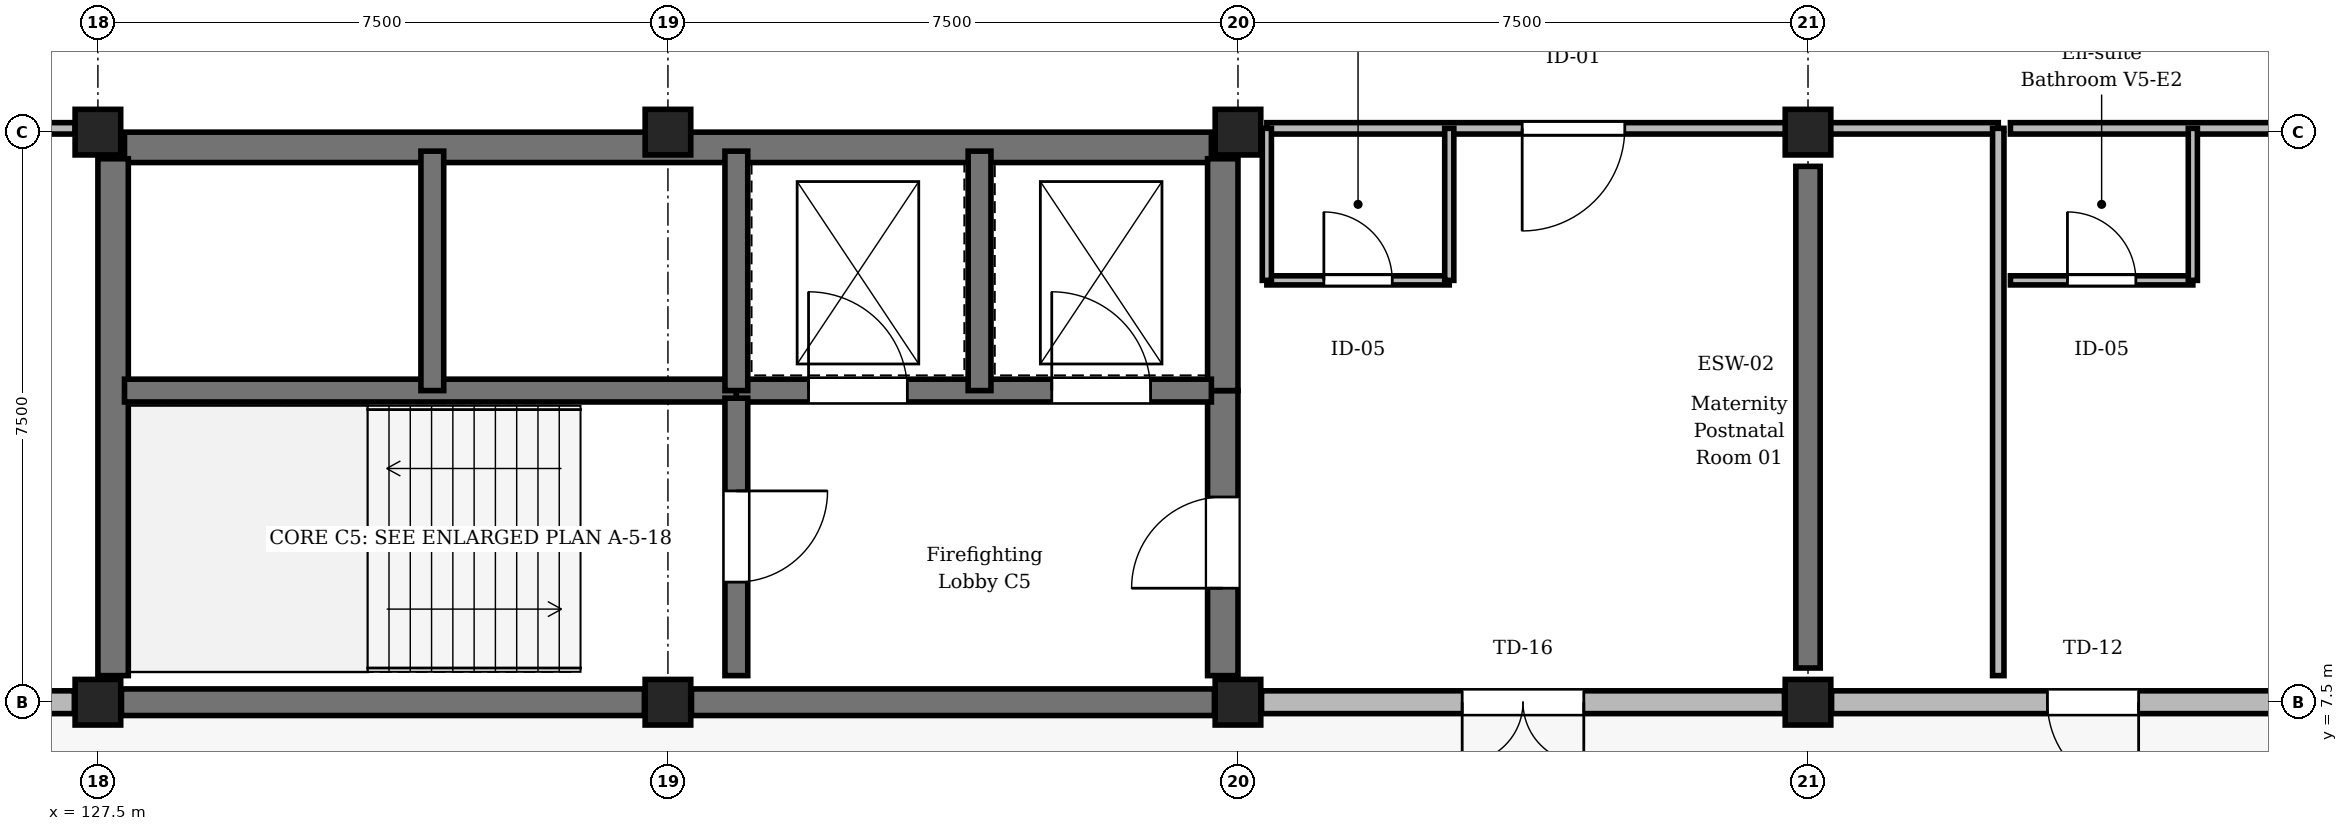
"""IFC4 building model, lengths in metres.
Left out: names, types, materials, properties, quantities, classifications, styles, units other than length and angle.
Written with IfcOpenShell. Run it as: python <this file> out.ifc"""

import sys

from ifc_helpers import new_model, si_unit, direction, frame, frame_2d, origin, origin_2d, place, context, subcontext, project, spatial, rectangle, circle, extrude, element, fill, save


model = new_model("IFC4")
c1 = context("Model", 3, precision=1e-05, world=origin(), true_north=direction((0.0, 1.0)))
c2 = subcontext(c1, "Body", "Model", "MODEL_VIEW")
j1 = project(units=[si_unit("LENGTHUNIT", "METRE"), si_unit("PLANEANGLEUNIT", "RADIAN")], contexts=[c1])
p1 = place(None, origin())
s1 = spatial("IfcSite", under=j1, at=p1, CompositionType="ELEMENT")
p2 = place(p1, origin())
s2 = spatial("IfcBuilding", under=s1, at=p2, CompositionType="ELEMENT")
p3 = place(p2, frame((0.0, 0.0, 14.1)))
s3 = spatial("IfcBuildingStorey", under=s2, at=p3, CompositionType="ELEMENT", Elevation=14.1)
p4 = place(p3, frame((127.5, 7.5, 0.0), z_axis=(0.0, 0.0, 1.0), x_axis=(1.0, 0.0, 0.0)))
e1 = element("IfcColumn", 1, at=p4, inside=s3, PredefinedType="COLUMN", context=c2, shape_type="SweptSolid", body=[
    extrude(circle(Radius=0.3, at=origin_2d()), origin(), (0.0, 0.0, 1.0), 3.75),
])
for number, where, z_axis, x_axis in (
    (2, (127.5, 15.0, 0.0), (0.0, 0.0, 1.0), (1.0, 0.0, 0.0)),
    (3, (135.0, 7.5, 0.0), (0.0, 0.0, 1.0), (1.0, 0.0, 0.0)),
    (4, (135.0, 15.0, 0.0), (0.0, 0.0, 1.0), (1.0, 0.0, 0.0)),
    (5, (142.5, 7.5, 0.0), (0.0, 0.0, 1.0), (1.0, 0.0, 0.0)),
):
    element("IfcColumn", number, at=place(p3, frame(where, z_axis=z_axis, x_axis=x_axis)), inside=s3, PredefinedType="COLUMN", context=c2, shape_type="SweptSolid", body=[
        extrude(rectangle(XDim=0.6, YDim=0.6, at=origin_2d()), origin(), (0.0, 0.0, 1.0), 3.75),
    ])
for number, where, z_axis, x_axis in (
    (6, (142.5, 15.0, 0.0), (0.0, 0.0, 1.0), (1.0, 0.0, 0.0)),
    (7, (150.0, 7.5, 0.0), (0.0, 0.0, 1.0), (1.0, 0.0, 0.0)),
):
    element("IfcColumn", number, at=place(p3, frame(where, z_axis=z_axis, x_axis=x_axis)), inside=s3, PredefinedType="COLUMN", context=c2, shape_type="SweptSolid", body=[
        extrude(circle(Radius=0.3, at=origin_2d()), origin(), (0.0, 0.0, 1.0), 3.75),
    ])
p5 = place(p3, frame((150.0, 15.0, 0.0), z_axis=(0.0, 0.0, 1.0), x_axis=(1.0, 0.0, 0.0)))
e8 = element("IfcColumn", 8, at=p5, inside=s3, PredefinedType="COLUMN", context=c2, shape_type="SweptSolid", body=[
    extrude(rectangle(XDim=0.6, YDim=0.6, at=origin_2d()), origin(), (0.0, 0.0, 1.0), 3.75),
])
p6 = place(p3, frame((150.0, 7.95, 0.0), z_axis=(0.0, 0.0, 1.0), x_axis=(0.0, 1.0, 0.0)))
e9 = element("IfcWall", 9, at=p6, inside=s3, PredefinedType="SHEAR", context=c2, shape_type="SweptSolid", body=[
    extrude(rectangle(XDim=6.6, YDim=0.32, at=frame_2d((3.3, 0.0))), origin(), (0.0, 0.0, 1.0), 2.92),
])
p7 = place(p3, frame((127.19, 7.5, 0.0), z_axis=(0.0, 0.0, 1.0), x_axis=(-1.0, 0.0, 0.0)))
e10 = element("IfcWall", 10, at=p7, inside=s3, PredefinedType="STANDARD", context=c2, shape_type="SweptSolid", body=[
    extrude(rectangle(XDim=6.88, YDim=0.3, at=frame_2d((3.44, 0.0))), origin(), (0.0, 0.0, 1.0), 2.87),
])
p8 = place(p7, frame((2.84, 0.0, 0.0)))
e11 = element("IfcOpeningElement", 11, at=p8, cuts=e10, PredefinedType="OPENING", context=c2, shape_type="SweptSolid", body=[
    extrude(rectangle(XDim=1.2, YDim=2.3, at=frame_2d((0.6, 1.15))), frame((0.0, 0.16, 0.0), z_axis=(0.0, -1.0, 0.0), x_axis=(1.0, 0.0, 0.0)), (0.0, 0.0, 1.0), 0.32),
])
for number, where, z_axis, x_axis in (
    (12, (134.69, 7.5, 0.0), (0.0, 0.0, 1.0), (-1.0, 0.0, 0.0)),
    (13, (142.19, 7.5, 0.0), (0.0, 0.0, 1.0), (-1.0, 0.0, 0.0)),
):
    element("IfcWall", number, at=place(p3, frame(where, z_axis=z_axis, x_axis=x_axis)), inside=s3, PredefinedType="SHEAR", context=c2, shape_type="SweptSolid", body=[
        extrude(rectangle(XDim=6.88, YDim=0.35, at=frame_2d((3.44, 0.0))), origin(), (0.0, 0.0, 1.0), 3.47),
    ])
p9 = place(p3, frame((149.69, 7.5, 0.0), z_axis=(0.0, 0.0, 1.0), x_axis=(-1.0, 0.0, 0.0)))
e14 = element("IfcWall", 14, at=p9, inside=s3, PredefinedType="STANDARD", context=c2, shape_type="SweptSolid", body=[
    extrude(rectangle(XDim=6.88, YDim=0.3, at=frame_2d((3.44, 0.0))), origin(), (0.0, 0.0, 1.0), 2.87),
])
p10 = place(p9, frame((2.64, 0.0, 0.0)))
e15 = element("IfcOpeningElement", 15, at=p10, cuts=e14, PredefinedType="OPENING", context=c2, shape_type="SweptSolid", body=[
    extrude(rectangle(XDim=1.6, YDim=2.35, at=frame_2d((0.8, 1.175))), frame((0.0, 0.16, 0.0), z_axis=(0.0, -1.0, 0.0), x_axis=(1.0, 0.0, 0.0)), (0.0, 0.0, 1.0), 0.32),
])
p11 = place(p3, frame((157.19, 7.5, 0.0), z_axis=(0.0, 0.0, 1.0), x_axis=(-1.0, 0.0, 0.0)))
e16 = element("IfcWall", 16, at=p11, inside=s3, PredefinedType="STANDARD", context=c2, shape_type="SweptSolid", body=[
    extrude(rectangle(XDim=6.88, YDim=0.3, at=frame_2d((3.44, 0.0))), origin(), (0.0, 0.0, 1.0), 2.87),
])
p12 = place(p11, frame((2.84, 0.0, 0.0)))
e17 = element("IfcOpeningElement", 17, at=p12, cuts=e16, PredefinedType="OPENING", context=c2, shape_type="SweptSolid", body=[
    extrude(rectangle(XDim=1.2, YDim=2.3, at=frame_2d((0.6, 1.15))), frame((0.0, 0.16, 0.0), z_axis=(0.0, -1.0, 0.0), x_axis=(1.0, 0.0, 0.0)), (0.0, 0.0, 1.0), 0.32),
])
p13 = place(p3, frame((127.85, 14.8, 0.0), z_axis=(0.0, 0.0, 1.0), x_axis=(1.0, 0.0, 0.0)))
e18 = element("IfcWall", 18, at=p13, inside=s3, PredefinedType="SHEAR", context=c2, shape_type="SweptSolid", body=[
    extrude(rectangle(XDim=14.3, YDim=0.4, at=frame_2d((7.15, 0.0))), origin(), (0.0, 0.0, 1.0), 3.47),
])
p14 = place(p3, frame((127.7, 7.85, 0.0), z_axis=(0.0, 0.0, 1.0), x_axis=(0.0, 1.0, 0.0)))
e19 = element("IfcWall", 19, at=p14, inside=s3, PredefinedType="SHEAR", context=c2, shape_type="SweptSolid", body=[
    extrude(rectangle(XDim=6.8, YDim=0.4, at=frame_2d((3.4, 0.0))), origin(), (0.0, 0.0, 1.0), 3.47),
])
p15 = place(p3, frame((142.3, 7.85, 0.0), z_axis=(0.0, 0.0, 1.0), x_axis=(0.0, 1.0, 0.0)))
e20 = element("IfcWall", 20, at=p15, inside=s3, PredefinedType="SHEAR", context=c2, shape_type="SweptSolid", body=[
    extrude(rectangle(XDim=3.75, YDim=0.4, at=frame_2d((1.875, 0.0))), origin(), (0.0, 0.0, 1.0), 3.47),
])
p16 = place(p15, frame((1.15, 0.0, 0.0)))
e21 = element("IfcOpeningElement", 21, at=p16, cuts=e20, PredefinedType="OPENING", context=c2, shape_type="SweptSolid", body=[
    extrude(rectangle(XDim=1.2, YDim=2.25, at=frame_2d((0.6, 1.125))), frame((0.0, 0.21, 0.0), z_axis=(0.0, -1.0, 0.0), x_axis=(1.0, 0.0, 0.0)), (0.0, 0.0, 1.0), 0.42),
])
p17 = place(p3, frame((142.3, 11.6, 0.0), z_axis=(0.0, 0.0, 1.0), x_axis=(0.0, 1.0, 0.0)))
e22 = element("IfcWall", 22, at=p17, inside=s3, PredefinedType="SHEAR", context=c2, shape_type="SweptSolid", body=[
    extrude(rectangle(XDim=3.05, YDim=0.4, at=frame_2d((1.525, 0.0))), origin(), (0.0, 0.0, 1.0), 3.47),
])
p18 = place(p3, frame((127.85, 11.6, 0.0), z_axis=(0.0, 0.0, 1.0), x_axis=(1.0, 0.0, 0.0)))
e23 = element("IfcWall", 23, at=p18, inside=s3, PredefinedType="SHEAR", context=c2, shape_type="SweptSolid", body=[
    extrude(rectangle(XDim=8.05, YDim=0.3, at=frame_2d((4.025, 0.0))), origin(), (0.0, 0.0, 1.0), 3.47),
])
p19 = place(p3, frame((135.9, 11.6, 0.0), z_axis=(0.0, 0.0, 1.0), x_axis=(1.0, 0.0, 0.0)))
e24 = element("IfcWall", 24, at=p19, inside=s3, PredefinedType="SHEAR", context=c2, shape_type="SweptSolid", body=[
    extrude(rectangle(XDim=6.25, YDim=0.3, at=frame_2d((3.125, 0.0))), origin(), (0.0, 0.0, 1.0), 3.47),
])
p20 = place(p19, frame((0.95, 0.0, 0.0)))
e25 = element("IfcOpeningElement", 25, at=p20, cuts=e24, PredefinedType="OPENING", context=c2, shape_type="SweptSolid", body=[
    extrude(rectangle(XDim=1.3, YDim=2.2, at=frame_2d((0.65, 1.1))), frame((0.0, 0.16, 0.0), z_axis=(0.0, -1.0, 0.0), x_axis=(1.0, 0.0, 0.0)), (0.0, 0.0, 1.0), 0.32),
])
p21 = place(p19, frame((4.15, 0.0, 0.0)))
e26 = element("IfcOpeningElement", 26, at=p21, cuts=e24, PredefinedType="OPENING", context=c2, shape_type="SweptSolid", body=[
    extrude(rectangle(XDim=1.3, YDim=2.2, at=frame_2d((0.65, 1.1))), frame((0.0, 0.16, 0.0), z_axis=(0.0, -1.0, 0.0), x_axis=(1.0, 0.0, 0.0)), (0.0, 0.0, 1.0), 0.32),
])
p22 = place(p3, frame((135.9, 11.5, 0.0), z_axis=(0.0, 0.0, 1.0), x_axis=(0.0, -1.0, 0.0)))
e27 = element("IfcWall", 27, at=p22, inside=s3, PredefinedType="SHEAR", context=c2, shape_type="SweptSolid", body=[
    extrude(rectangle(XDim=3.65, YDim=0.3, at=frame_2d((1.825, 0.0))), origin(), (0.0, 0.0, 1.0), 3.47),
])
p23 = place(p22, frame((1.22, 0.0, 0.0)))
e28 = element("IfcOpeningElement", 28, at=p23, cuts=e27, PredefinedType="OPENING", context=c2, shape_type="SweptSolid", body=[
    extrude(rectangle(XDim=1.2, YDim=2.25, at=frame_2d((0.6, 1.125))), frame((0.0, 0.16, 0.0), z_axis=(0.0, -1.0, 0.0), x_axis=(1.0, 0.0, 0.0)), (0.0, 0.0, 1.0), 0.32),
])
for number, where, z_axis, x_axis in (
    (29, (131.9, 11.6, 0.0), (0.0, 0.0, 1.0), (0.0, 1.0, 0.0)),
    (30, (135.9, 11.6, 0.0), (0.0, 0.0, 1.0), (0.0, 1.0, 0.0)),
    (31, (139.1, 11.6, 0.0), (0.0, 0.0, 1.0), (0.0, 1.0, 0.0)),
):
    element("IfcWall", number, at=place(p3, frame(where, z_axis=z_axis, x_axis=x_axis)), inside=s3, PredefinedType="SHEAR", context=c2, shape_type="SweptSolid", body=[
        extrude(rectangle(XDim=3.15, YDim=0.3, at=frame_2d((1.575, 0.0))), origin(), (0.0, 0.0, 1.0), 3.47),
    ])
p24 = place(p3, frame((127.2, 15.05, 0.0), z_axis=(0.0, 0.0, 1.0), x_axis=(-1.0, 0.0, 0.0)))
e32 = element("IfcWall", 32, at=p24, inside=s3, PredefinedType="PARTITIONING", context=c2, shape_type="SweptSolid", body=[
    extrude(rectangle(XDim=14.35, YDim=0.15, at=frame_2d((7.175, 0.0))), origin(), (0.0, 0.0, 1.0), 2.855),
])
p25 = place(p24, frame((2.77, 0.0, 0.0)))
e33 = element("IfcOpeningElement", 33, at=p25, cuts=e32, PredefinedType="OPENING", context=c2, shape_type="SweptSolid", body=[
    extrude(rectangle(XDim=1.25, YDim=2.2, at=frame_2d((0.625, 1.1))), frame((0.0, 0.085, 0.0), z_axis=(0.0, -1.0, 0.0), x_axis=(1.0, 0.0, 0.0)), (0.0, 0.0, 1.0), 0.17),
])
p26 = place(p3, frame((152.503, 15.05, 0.0), z_axis=(0.0, 0.0, 1.0), x_axis=(-1.0, 0.0, 0.0)))
e34 = element("IfcWall", 34, at=p26, inside=s3, PredefinedType="PARTITIONING", context=c2, shape_type="SweptSolid", body=[
    extrude(rectangle(XDim=9.624, YDim=0.15, at=frame_2d((4.812, 0.0))), origin(), (0.0, 0.0, 1.0), 2.855),
])
p27 = place(p26, frame((4.914, 0.0, 0.0)))
e35 = element("IfcOpeningElement", 35, at=p27, cuts=e34, PredefinedType="OPENING", context=c2, shape_type="SweptSolid", body=[
    extrude(rectangle(XDim=1.35, YDim=2.25, at=frame_2d((0.675, 1.125))), frame((0.0, 0.085, 0.0), z_axis=(0.0, -1.0, 0.0), x_axis=(1.0, 0.0, 0.0)), (0.0, 0.0, 1.0), 0.17),
])
p28 = place(p3, frame((142.88, 13.05, 0.0), z_axis=(0.0, 0.0, 1.0), x_axis=(1.0, 0.0, 0.0)))
e36 = element("IfcWall", 36, at=p28, inside=s3, PredefinedType="PARTITIONING", context=c2, shape_type="SweptSolid", body=[
    extrude(rectangle(XDim=2.4, YDim=0.12, at=frame_2d((1.2, 0.0))), origin(), (0.0, 0.0, 1.0), 3.455),
])
p29 = place(p28, frame((0.75, 0.0, 0.0)))
e37 = element("IfcOpeningElement", 37, at=p29, cuts=e36, PredefinedType="OPENING", context=c2, shape_type="SweptSolid", body=[
    extrude(rectangle(XDim=0.9, YDim=2.1, at=frame_2d((0.45, 1.05))), frame((0.0, 0.07, 0.0), z_axis=(0.0, -1.0, 0.0), x_axis=(1.0, 0.0, 0.0)), (0.0, 0.0, 1.0), 0.14),
])
p30 = place(p3, frame((145.28, 13.05, 0.0), z_axis=(0.0, 0.0, 1.0), x_axis=(0.0, 1.0, 0.0)))
e38 = element("IfcWall", 38, at=p30, inside=s3, PredefinedType="PARTITIONING", context=c2, shape_type="SweptSolid", body=[
    extrude(rectangle(XDim=2.0, YDim=0.12, at=frame_2d((1.0, 0.0))), origin(), (0.0, 0.0, 1.0), 3.455),
])
p31 = place(p3, frame((162.287, 15.05, 0.0), z_axis=(0.0, 0.0, 1.0), x_axis=(-1.0, 0.0, 0.0)))
e39 = element("IfcWall", 39, at=p31, inside=s3, PredefinedType="PARTITIONING", context=c2, shape_type="SweptSolid", body=[
    extrude(rectangle(XDim=9.623, YDim=0.15, at=frame_2d((4.812, 0.0))), origin(), (0.0, 0.0, 1.0), 2.855),
])
p32 = place(p31, frame((0.25, 0.0, 0.0)))
e40 = element("IfcOpeningElement", 40, at=p32, cuts=e39, PredefinedType="OPENING", context=c2, shape_type="SweptSolid", body=[
    extrude(rectangle(XDim=1.35, YDim=2.25, at=frame_2d((0.675, 1.125))), frame((0.0, 0.085, 0.0), z_axis=(0.0, -1.0, 0.0), x_axis=(1.0, 0.0, 0.0)), (0.0, 0.0, 1.0), 0.17),
])
p33 = place(p3, frame((152.663, 13.05, 0.0), z_axis=(0.0, 0.0, 1.0), x_axis=(1.0, 0.0, 0.0)))
e41 = element("IfcWall", 41, at=p33, inside=s3, PredefinedType="PARTITIONING", context=c2, shape_type="SweptSolid", body=[
    extrude(rectangle(XDim=2.4, YDim=0.12, at=frame_2d((1.2, 0.0))), origin(), (0.0, 0.0, 1.0), 3.455),
])
p34 = place(p33, frame((0.75, 0.0, 0.0)))
e42 = element("IfcOpeningElement", 42, at=p34, cuts=e41, PredefinedType="OPENING", context=c2, shape_type="SweptSolid", body=[
    extrude(rectangle(XDim=0.9, YDim=2.1, at=frame_2d((0.45, 1.05))), frame((0.0, 0.07, 0.0), z_axis=(0.0, -1.0, 0.0), x_axis=(1.0, 0.0, 0.0)), (0.0, 0.0, 1.0), 0.14),
])
p35 = place(p3, frame((155.063, 13.05, 0.0), z_axis=(0.0, 0.0, 1.0), x_axis=(0.0, 1.0, 0.0)))
e43 = element("IfcWall", 43, at=p35, inside=s3, PredefinedType="PARTITIONING", context=c2, shape_type="SweptSolid", body=[
    extrude(rectangle(XDim=2.0, YDim=0.12, at=frame_2d((1.0, 0.0))), origin(), (0.0, 0.0, 1.0), 3.455),
])
p36 = place(p3, frame((152.503, 7.85, 0.0), z_axis=(0.0, 0.0, 1.0), x_axis=(0.0, 1.0, 0.0)))
e44 = element("IfcWall", 44, at=p36, inside=s3, PredefinedType="PARTITIONING", context=c2, shape_type="SweptSolid", body=[
    extrude(rectangle(XDim=7.2, YDim=0.15, at=frame_2d((3.6, 0.0))), origin(), (0.0, 0.0, 1.0), 3.455),
])
p37 = place(p3, frame((142.88, 13.05, 0.0), z_axis=(0.0, 0.0, 1.0), x_axis=(0.0, 1.0, 0.0)))
e45 = element("IfcWall", 45, at=p37, inside=s3, PredefinedType="PARTITIONING", context=c2, shape_type="SweptSolid", body=[
    extrude(rectangle(XDim=2.0, YDim=0.12, at=frame_2d((1.0, 0.0))), origin(), (0.0, 0.0, 1.0), 2.905),
])
p38 = place(p10, origin())
e46 = element("IfcDoor", 46, at=p38, inside=s3, OperationType="DOUBLE_DOOR_SINGLE_SWING", PredefinedType="DOOR", context=c2, shape_type="SweptSolid", body=[
    extrude(rectangle(XDim=1.6, YDim=2.35, at=frame_2d((0.8, 1.175))), frame((0.0, 0.025, 0.0), z_axis=(0.0, -1.0, 0.0), x_axis=(1.0, 0.0, 0.0)), (0.0, 0.0, 1.0), 0.05),
])
fill(e15, e46)
p39 = place(p12, origin())
e47 = element("IfcDoor", 47, at=p39, inside=s3, OperationType="SINGLE_SWING_LEFT", PredefinedType="DOOR", context=c2, shape_type="SweptSolid", body=[
    extrude(rectangle(XDim=1.2, YDim=2.3, at=frame_2d((0.6, 1.15))), frame((0.0, 0.025, 0.0), z_axis=(0.0, -1.0, 0.0), x_axis=(1.0, 0.0, 0.0)), (0.0, 0.0, 1.0), 0.05),
])
fill(e17, e47)
p40 = place(p16, origin())
e48 = element("IfcDoor", 48, at=p40, inside=s3, OperationType="SINGLE_SWING_LEFT", PredefinedType="DOOR", context=c2, shape_type="SweptSolid", body=[
    extrude(rectangle(XDim=1.2, YDim=2.25, at=frame_2d((0.6, 1.125))), frame((0.0, 0.025, 0.0), z_axis=(0.0, -1.0, 0.0), x_axis=(1.0, 0.0, 0.0)), (0.0, 0.0, 1.0), 0.05),
])
fill(e21, e48)
p41 = place(p20, origin())
e49 = element("IfcDoor", 49, at=p41, inside=s3, OperationType="DOUBLE_DOOR_SLIDING", PredefinedType="DOOR", context=c2, shape_type="SweptSolid", body=[
    extrude(rectangle(XDim=1.3, YDim=2.2, at=frame_2d((0.65, 1.1))), frame((0.0, 0.025, 0.0), z_axis=(0.0, -1.0, 0.0), x_axis=(1.0, 0.0, 0.0)), (0.0, 0.0, 1.0), 0.05),
])
fill(e25, e49)
p42 = place(p21, origin())
e50 = element("IfcDoor", 50, at=p42, inside=s3, OperationType="DOUBLE_DOOR_SLIDING", PredefinedType="DOOR", context=c2, shape_type="SweptSolid", body=[
    extrude(rectangle(XDim=1.3, YDim=2.2, at=frame_2d((0.65, 1.1))), frame((0.0, 0.025, 0.0), z_axis=(0.0, -1.0, 0.0), x_axis=(1.0, 0.0, 0.0)), (0.0, 0.0, 1.0), 0.05),
])
fill(e26, e50)
p43 = place(p23, origin())
e51 = element("IfcDoor", 51, at=p43, inside=s3, OperationType="SINGLE_SWING_LEFT", PredefinedType="DOOR", context=c2, shape_type="SweptSolid", body=[
    extrude(rectangle(XDim=1.2, YDim=2.25, at=frame_2d((0.6, 1.125))), frame((0.0, 0.025, 0.0), z_axis=(0.0, -1.0, 0.0), x_axis=(1.0, 0.0, 0.0)), (0.0, 0.0, 1.0), 0.05),
])
fill(e28, e51)
p44 = place(p27, origin())
e52 = element("IfcDoor", 52, at=p44, inside=s3, OperationType="SINGLE_SWING_RIGHT", PredefinedType="DOOR", context=c2, shape_type="SweptSolid", body=[
    extrude(rectangle(XDim=1.35, YDim=2.25, at=frame_2d((0.675, 1.125))), frame((0.0, 0.025, 0.0), z_axis=(0.0, -1.0, 0.0), x_axis=(1.0, 0.0, 0.0)), (0.0, 0.0, 1.0), 0.05),
])
fill(e35, e52)
p45 = place(p29, origin())
e53 = element("IfcDoor", 53, at=p45, inside=s3, OperationType="SINGLE_SWING_LEFT", PredefinedType="DOOR", context=c2, shape_type="SweptSolid", body=[
    extrude(rectangle(XDim=0.9, YDim=2.1, at=frame_2d((0.45, 1.05))), frame((0.0, 0.025, 0.0), z_axis=(0.0, -1.0, 0.0), x_axis=(1.0, 0.0, 0.0)), (0.0, 0.0, 1.0), 0.05),
])
fill(e37, e53)
p46 = place(p34, origin())
e54 = element("IfcDoor", 54, at=p46, inside=s3, OperationType="SINGLE_SWING_LEFT", PredefinedType="DOOR", context=c2, shape_type="SweptSolid", body=[
    extrude(rectangle(XDim=0.9, YDim=2.1, at=frame_2d((0.45, 1.05))), frame((0.0, 0.025, 0.0), z_axis=(0.0, -1.0, 0.0), x_axis=(1.0, 0.0, 0.0)), (0.0, 0.0, 1.0), 0.05),
])
fill(e42, e54)
save(model, sys.argv[1])
